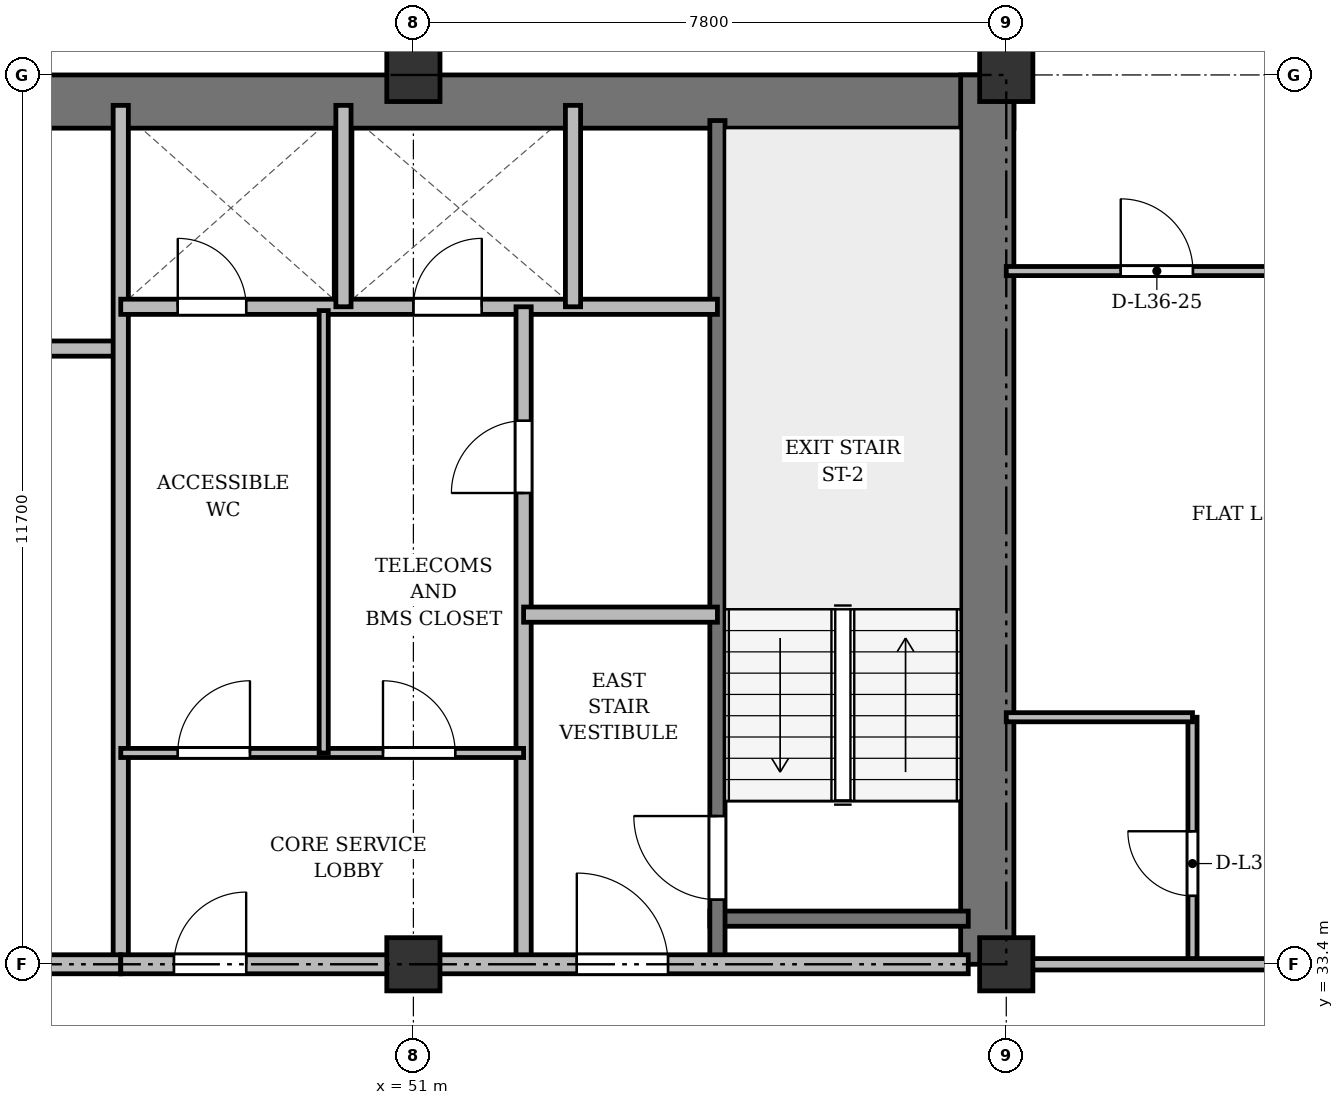
"""IFC4 building model, lengths in metres.
Left out: names, types, materials, properties, quantities, classifications, styles, units other than length and angle.
Written with IfcOpenShell. Run it as: python <this file> out.ifc"""

import sys

from ifc_helpers import new_model, si_unit, direction, frame, frame_2d, origin, origin_2d, place, context, subcontext, project, spatial, rectangle, extrude, source, transform, mapped, element, fill, save


model = new_model("IFC4")
c1 = context("Model", 3, precision=1e-05, world=origin(), true_north=direction((0.0, 1.0)))
c2 = subcontext(c1, "Body", "Model", "MODEL_VIEW")
j1 = project(units=[si_unit("LENGTHUNIT", "METRE"), si_unit("PLANEANGLEUNIT", "RADIAN")], contexts=[c1])
p1 = place(None, origin())
s1 = spatial("IfcSite", under=j1, at=p1, CompositionType="ELEMENT")
p2 = place(p1, origin())
s2 = spatial("IfcBuilding", under=s1, at=p2, CompositionType="ELEMENT")
p3 = place(p2, frame((0.0, 0.0, 139.3)))
s3 = spatial("IfcBuildingStorey", under=s2, at=p3, CompositionType="ELEMENT", Elevation=139.3)
m1 = source(origin(), c2, "Body", "SweptSolid", [
    extrude(rectangle(XDim=0.7, YDim=0.7, at=origin_2d()), origin(), (0.0, 0.0, 1.0), 3.6),
])
for number, where, z_axis, x_axis in (
    (1, (51.0, 33.4, 0.0), (0.0, 0.0, 1.0), (1.0, 0.0, 0.0)),
    (2, (51.0, 45.1, 0.0), (0.0, 0.0, 1.0), (1.0, 0.0, 0.0)),
    (3, (58.8, 33.4, 0.0), (0.0, 0.0, 1.0), (1.0, 0.0, 0.0)),
    (4, (58.8, 45.1, 0.0), (0.0, 0.0, 1.0), (1.0, 0.0, 0.0)),
):
    element("IfcColumn", number, at=place(p3, frame(where, z_axis=z_axis, x_axis=x_axis)), inside=s3, PredefinedType="COLUMN", context=c2, shape_type="MappedRepresentation", body=[
        mapped(m1, transform((0.0, 0.0, 0.0), x_axis=(1.0, 0.0, 0.0), y_axis=(0.0, 1.0, 0.0), z_axis=(0.0, 0.0, 1.0), scale=1.0)),
    ])
p4 = place(p3, frame((15.5, 44.75, 0.0), z_axis=(0.0, 0.0, 1.0), x_axis=(1.0, 0.0, 0.0)))
e5 = element("IfcWall", 5, at=p4, inside=s3, PredefinedType="SHEAR", context=c2, shape_type="SweptSolid", body=[
    extrude(rectangle(XDim=43.4, YDim=0.7, at=frame_2d((21.7, 0.0))), origin(), (0.0, 0.0, 1.0), 3.35),
])
p5 = place(p3, frame((58.55, 33.4, 0.0), z_axis=(0.0, 0.0, 1.0), x_axis=(0.0, 1.0, 0.0)))
e6 = element("IfcWall", 6, at=p5, inside=s3, PredefinedType="SHEAR", context=c2, shape_type="SweptSolid", body=[
    extrude(rectangle(XDim=11.7, YDim=0.7, at=frame_2d((5.85, 0.0))), origin(), (0.0, 0.0, 1.0), 3.35),
])
p6 = place(p3, frame((54.9, 34.0, 0.0), z_axis=(0.0, 0.0, 1.0), x_axis=(1.0, 0.0, 0.0)))
e7 = element("IfcWall", 7, at=p6, inside=s3, PredefinedType="SHEAR", context=c2, shape_type="SweptSolid", body=[
    extrude(rectangle(XDim=3.4, YDim=0.2, at=frame_2d((1.7, 0.0))), origin(), (0.0, 0.0, 1.0), 3.35),
])
p7 = place(p3, frame((55.0, 33.4, 0.0), z_axis=(0.0, 0.0, 1.0), x_axis=(0.0, 1.0, 0.0)))
e8 = element("IfcWall", 8, at=p7, inside=s3, PredefinedType="SHEAR", context=c2, shape_type="SweptSolid", body=[
    extrude(rectangle(XDim=11.1, YDim=0.2, at=frame_2d((5.55, 0.0))), origin(), (0.0, 0.0, 1.0), 3.35),
])
p8 = place(p7, frame((0.85, 0.0, 0.0)))
e9 = element("IfcOpeningElement", 9, at=p8, cuts=e8, PredefinedType="OPENING", context=c2, shape_type="SweptSolid", body=[
    extrude(rectangle(XDim=1.1, YDim=2.15, at=frame_2d((0.55, 1.075))), frame((0.0, 0.11, 0.0), z_axis=(0.0, -1.0, 0.0), x_axis=(1.0, 0.0, 0.0)), (0.0, 0.0, 1.0), 0.22),
])
p9 = place(p3, frame((40.25, 41.5, 0.0), z_axis=(0.0, 0.0, 1.0), x_axis=(1.0, 0.0, 0.0)))
e10 = element("IfcWall", 10, at=p9, inside=s3, PredefinedType="SOLIDWALL", context=c2, shape_type="SweptSolid", body=[
    extrude(rectangle(XDim=6.9, YDim=0.2, at=frame_2d((3.45, 0.0))), origin(), (0.0, 0.0, 1.0), 2.85),
])
p10 = place(p3, frame((47.15, 33.4, 0.0), z_axis=(0.0, 0.0, 1.0), x_axis=(0.0, 1.0, 0.0)))
e11 = element("IfcWall", 11, at=p10, inside=s3, PredefinedType="SOLIDWALL", context=c2, shape_type="SweptSolid", body=[
    extrude(rectangle(XDim=11.3, YDim=0.2, at=frame_2d((5.65, 0.0))), origin(), (0.0, 0.0, 1.0), 2.75),
])
p11 = place(p3, frame((33.3, 33.4, 0.0), z_axis=(0.0, 0.0, 1.0), x_axis=(1.0, 0.0, 0.0)))
e12 = element("IfcWall", 12, at=p11, inside=s3, PredefinedType="PARTITIONING", context=c2, shape_type="SweptSolid", body=[
    extrude(rectangle(XDim=13.85, YDim=0.25, at=frame_2d((6.925, 0.0))), origin(), (0.0, 0.0, 1.0), 2.75),
])
p12 = place(p11, frame((4.2, 0.0, 0.0)))
e13 = element("IfcOpeningElement", 13, at=p12, cuts=e12, PredefinedType="OPENING", context=c2, shape_type="SweptSolid", body=[
    extrude(rectangle(XDim=1.6, YDim=2.2, at=frame_2d((0.8, 1.1))), frame((0.0, 0.135, 0.0), z_axis=(0.0, -1.0, 0.0), x_axis=(1.0, 0.0, 0.0)), (0.0, 0.0, 1.0), 0.27),
])
p13 = place(p3, frame((47.15, 42.05, 0.0), z_axis=(0.0, 0.0, 1.0), x_axis=(1.0, 0.0, 0.0)))
e14 = element("IfcWall", 14, at=p13, inside=s3, PredefinedType="SOLIDWALL", context=c2, shape_type="SweptSolid", body=[
    extrude(rectangle(XDim=7.85, YDim=0.2, at=frame_2d((3.925, 0.0))), origin(), (0.0, 0.0, 1.0), 2.85),
])
p14 = place(p13, frame((0.75, 0.0, 0.0)))
e15 = element("IfcOpeningElement", 15, at=p14, cuts=e14, PredefinedType="OPENING", context=c2, shape_type="SweptSolid", body=[
    extrude(rectangle(XDim=0.9, YDim=2.1, at=frame_2d((0.45, 1.05))), frame((0.0, 0.11, 0.0), z_axis=(0.0, -1.0, 0.0), x_axis=(1.0, 0.0, 0.0)), (0.0, 0.0, 1.0), 0.22),
])
p15 = place(p13, frame((3.85, 0.0, 0.0)))
e16 = element("IfcOpeningElement", 16, at=p15, cuts=e14, PredefinedType="OPENING", context=c2, shape_type="SweptSolid", body=[
    extrude(rectangle(XDim=0.9, YDim=2.1, at=frame_2d((0.45, 1.05))), frame((0.0, 0.11, 0.0), z_axis=(0.0, -1.0, 0.0), x_axis=(1.0, 0.0, 0.0)), (0.0, 0.0, 1.0), 0.22),
])
for number, where, z_axis, x_axis in (
    (17, (50.08, 42.05, 0.0), (0.0, 0.0, 1.0), (0.0, 1.0, 0.0)),
    (18, (53.1, 42.05, 0.0), (0.0, 0.0, 1.0), (0.0, 1.0, 0.0)),
):
    element("IfcWall", number, at=place(p3, frame(where, z_axis=z_axis, x_axis=x_axis)), inside=s3, PredefinedType="SOLIDWALL", context=c2, shape_type="SweptSolid", body=[
        extrude(rectangle(XDim=2.65, YDim=0.2, at=frame_2d((1.325, 0.0))), origin(), (0.0, 0.0, 1.0), 3.35),
    ])
p16 = place(p3, frame((52.45, 33.4, 0.0), z_axis=(0.0, 0.0, 1.0), x_axis=(0.0, 1.0, 0.0)))
e19 = element("IfcWall", 19, at=p16, inside=s3, PredefinedType="PARTITIONING", context=c2, shape_type="SweptSolid", body=[
    extrude(rectangle(XDim=8.65, YDim=0.2, at=frame_2d((4.325, 0.0))), origin(), (0.0, 0.0, 1.0), 2.75),
])
p17 = place(p16, frame((6.2, 0.0, 0.0)))
e20 = element("IfcOpeningElement", 20, at=p17, cuts=e19, PredefinedType="OPENING", context=c2, shape_type="SweptSolid", body=[
    extrude(rectangle(XDim=0.95, YDim=2.15, at=frame_2d((0.475, 1.075))), frame((0.0, 0.11, 0.0), z_axis=(0.0, -1.0, 0.0), x_axis=(1.0, 0.0, 0.0)), (0.0, 0.0, 1.0), 0.22),
])
p18 = place(p3, frame((52.45, 38.0, 0.0), z_axis=(0.0, 0.0, 1.0), x_axis=(1.0, 0.0, 0.0)))
e21 = element("IfcWall", 21, at=p18, inside=s3, PredefinedType="PARTITIONING", context=c2, shape_type="SweptSolid", body=[
    extrude(rectangle(XDim=2.55, YDim=0.2, at=frame_2d((1.275, 0.0))), origin(), (0.0, 0.0, 1.0), 3.35),
])
p19 = place(p3, frame((47.15, 36.18, 0.0), z_axis=(0.0, 0.0, 1.0), x_axis=(1.0, 0.0, 0.0)))
e22 = element("IfcWall", 22, at=p19, inside=s3, PredefinedType="PARTITIONING", context=c2, shape_type="SweptSolid", body=[
    extrude(rectangle(XDim=5.3, YDim=0.12, at=frame_2d((2.65, 0.0))), origin(), (0.0, 0.0, 1.0), 2.85),
])
p20 = place(p19, frame((0.75, 0.0, 0.0)))
e23 = element("IfcOpeningElement", 23, at=p20, cuts=e22, PredefinedType="OPENING", context=c2, shape_type="SweptSolid", body=[
    extrude(rectangle(XDim=0.95, YDim=2.15, at=frame_2d((0.475, 1.075))), frame((0.0, 0.07, 0.0), z_axis=(0.0, -1.0, 0.0), x_axis=(1.0, 0.0, 0.0)), (0.0, 0.0, 1.0), 0.14),
])
p21 = place(p19, frame((3.45, 0.0, 0.0)))
e24 = element("IfcOpeningElement", 24, at=p21, cuts=e22, PredefinedType="OPENING", context=c2, shape_type="SweptSolid", body=[
    extrude(rectangle(XDim=0.95, YDim=2.15, at=frame_2d((0.475, 1.075))), frame((0.0, 0.07, 0.0), z_axis=(0.0, -1.0, 0.0), x_axis=(1.0, 0.0, 0.0)), (0.0, 0.0, 1.0), 0.14),
])
p22 = place(p3, frame((49.82, 36.18, 0.0), z_axis=(0.0, 0.0, 1.0), x_axis=(0.0, 1.0, 0.0)))
e25 = element("IfcWall", 25, at=p22, inside=s3, PredefinedType="PARTITIONING", context=c2, shape_type="SweptSolid", body=[
    extrude(rectangle(XDim=5.82, YDim=0.12, at=frame_2d((2.91, 0.0))), origin(), (0.0, 0.0, 1.0), 3.35),
])
p23 = place(p3, frame((47.15, 33.4, 0.0), z_axis=(0.0, 0.0, 1.0), x_axis=(1.0, 0.0, 0.0)))
e26 = element("IfcWall", 26, at=p23, inside=s3, PredefinedType="PARTITIONING", context=c2, shape_type="SweptSolid", body=[
    extrude(rectangle(XDim=11.15, YDim=0.25, at=frame_2d((5.575, 0.0))), origin(), (0.0, 0.0, 1.0), 2.75),
])
p24 = place(p23, frame((0.7, 0.0, 0.0)))
e27 = element("IfcOpeningElement", 27, at=p24, cuts=e26, PredefinedType="OPENING", context=c2, shape_type="SweptSolid", body=[
    extrude(rectangle(XDim=0.95, YDim=2.15, at=frame_2d((0.475, 1.075))), frame((0.0, 0.135, 0.0), z_axis=(0.0, -1.0, 0.0), x_axis=(1.0, 0.0, 0.0)), (0.0, 0.0, 1.0), 0.27),
])
p25 = place(p23, frame((6.0, 0.0, 0.0)))
e28 = element("IfcOpeningElement", 28, at=p25, cuts=e26, PredefinedType="OPENING", context=c2, shape_type="SweptSolid", body=[
    extrude(rectangle(XDim=1.2, YDim=2.15, at=frame_2d((0.6, 1.075))), frame((0.0, 0.135, 0.0), z_axis=(0.0, -1.0, 0.0), x_axis=(1.0, 0.0, 0.0)), (0.0, 0.0, 1.0), 0.27),
])
p26 = place(p3, frame((61.25, 33.4, 0.0), z_axis=(0.0, 0.0, 1.0), x_axis=(0.0, 1.0, 0.0)))
e29 = element("IfcWall", 29, at=p26, inside=s3, PredefinedType="PARTITIONING", context=c2, shape_type="SweptSolid", body=[
    extrude(rectangle(XDim=3.25, YDim=0.12, at=frame_2d((1.625, 0.0))), origin(), (0.0, 0.0, 1.0), 2.75),
])
p27 = place(p26, frame((0.9, 0.0, 0.0)))
e30 = element("IfcOpeningElement", 30, at=p27, cuts=e29, PredefinedType="OPENING", context=c2, shape_type="SweptSolid", body=[
    extrude(rectangle(XDim=0.85, YDim=2.1, at=frame_2d((0.425, 1.05))), frame((0.0, 0.07, 0.0), z_axis=(0.0, -1.0, 0.0), x_axis=(1.0, 0.0, 0.0)), (0.0, 0.0, 1.0), 0.14),
])
p28 = place(p3, frame((58.8, 36.65, 0.0), z_axis=(0.0, 0.0, 1.0), x_axis=(1.0, 0.0, 0.0)))
e31 = element("IfcWall", 31, at=p28, inside=s3, PredefinedType="PARTITIONING", context=c2, shape_type="SweptSolid", body=[
    extrude(rectangle(XDim=2.45, YDim=0.12, at=frame_2d((1.225, 0.0))), origin(), (0.0, 0.0, 1.0), 2.85),
])
p29 = place(p3, frame((58.8, 42.52, 0.0), z_axis=(0.0, 0.0, 1.0), x_axis=(1.0, 0.0, 0.0)))
e32 = element("IfcWall", 32, at=p29, inside=s3, PredefinedType="PARTITIONING", context=c2, shape_type="SweptSolid", body=[
    extrude(rectangle(XDim=3.775, YDim=0.12, at=frame_2d((1.887, 0.0))), origin(), (0.0, 0.0, 1.0), 2.85),
])
p30 = place(p29, frame((1.506, 0.0, 0.0)))
e33 = element("IfcOpeningElement", 33, at=p30, cuts=e32, PredefinedType="OPENING", context=c2, shape_type="SweptSolid", body=[
    extrude(rectangle(XDim=0.95, YDim=2.15, at=frame_2d((0.475, 1.075))), frame((0.0, 0.07, 0.0), z_axis=(0.0, -1.0, 0.0), x_axis=(1.0, 0.0, 0.0)), (0.0, 0.0, 1.0), 0.14),
])
p31 = place(p3, frame((58.8, 33.4, 0.0), z_axis=(0.0, 0.0, 1.0), x_axis=(1.0, 0.0, 0.0)))
e34 = element("IfcWall", 34, at=p31, inside=s3, PredefinedType="PARTITIONING", context=c2, shape_type="SweptSolid", body=[
    extrude(rectangle(XDim=7.55, YDim=0.15, at=frame_2d((3.775, 0.0))), origin(), (0.0, 0.0, 1.0), 2.75),
])
p32 = place(p31, frame((4.375, 0.0, 0.0)))
e35 = element("IfcOpeningElement", 35, at=p32, cuts=e34, PredefinedType="OPENING", context=c2, shape_type="SweptSolid", body=[
    extrude(rectangle(XDim=0.95, YDim=2.15, at=frame_2d((0.475, 1.075))), frame((0.0, 0.085, 0.0), z_axis=(0.0, -1.0, 0.0), x_axis=(1.0, 0.0, 0.0)), (0.0, 0.0, 1.0), 0.17),
])
p33 = place(p3, frame((58.8, 44.75, 0.0), z_axis=(0.0, 0.0, 1.0), x_axis=(0.0, 1.0, 0.0)))
e36 = element("IfcWall", 36, at=p33, inside=s3, PredefinedType="PARTITIONING", context=c2, shape_type="SweptSolid", body=[
    extrude(rectangle(XDim=3.61, YDim=0.15, at=frame_2d((1.805, 0.0))), origin(), (0.0, 0.0, 1.0), 2.85),
])
p34 = place(p33, frame((1.1, 0.0, 0.0)))
e37 = element("IfcOpeningElement", 37, at=p34, cuts=e36, PredefinedType="OPENING", context=c2, shape_type="SweptSolid", body=[
    extrude(rectangle(XDim=0.95, YDim=2.15, at=frame_2d((0.475, 1.075))), frame((0.0, 0.085, 0.0), z_axis=(0.0, -1.0, 0.0), x_axis=(1.0, 0.0, 0.0)), (0.0, 0.0, 1.0), 0.17),
])
m2 = source(origin(), c2, "Body", "SweptSolid", [
    extrude(rectangle(XDim=1.1, YDim=2.15, at=frame_2d((0.55, 1.075))), frame((0.0, 0.025, 0.0), z_axis=(0.0, -1.0, 0.0), x_axis=(1.0, 0.0, 0.0)), (0.0, 0.0, 1.0), 0.05),
])
p35 = place(p8, origin())
e38 = element("IfcDoor", 38, at=p35, inside=s3, OperationType="SINGLE_SWING_RIGHT", PredefinedType="DOOR", context=c2, shape_type="MappedRepresentation", body=[
    mapped(m2, transform((0.0, 0.0, 0.0), x_axis=(1.0, 0.0, 0.0), y_axis=(0.0, 1.0, 0.0), z_axis=(0.0, 0.0, 1.0), scale=1.0)),
])
fill(e9, e38)
m3 = source(origin(), c2, "Body", "SweptSolid", [
    extrude(rectangle(XDim=0.9, YDim=2.1, at=frame_2d((0.45, 1.05))), frame((0.0, 0.025, 0.0), z_axis=(0.0, -1.0, 0.0), x_axis=(1.0, 0.0, 0.0)), (0.0, 0.0, 1.0), 0.05),
])
p36 = place(p14, origin())
e39 = element("IfcDoor", 39, at=p36, inside=s3, OperationType="SINGLE_SWING_LEFT", PredefinedType="DOOR", context=c2, shape_type="MappedRepresentation", body=[
    mapped(m3, transform((0.0, 0.0, 0.0), x_axis=(1.0, 0.0, 0.0), y_axis=(0.0, 1.0, 0.0), z_axis=(0.0, 0.0, 1.0), scale=1.0)),
])
fill(e15, e39)
p37 = place(p15, origin())
e40 = element("IfcDoor", 40, at=p37, inside=s3, OperationType="SINGLE_SWING_RIGHT", PredefinedType="DOOR", context=c2, shape_type="MappedRepresentation", body=[
    mapped(m3, transform((0.0, 0.0, 0.0), x_axis=(1.0, 0.0, 0.0), y_axis=(0.0, 1.0, 0.0), z_axis=(0.0, 0.0, 1.0), scale=1.0)),
])
fill(e16, e40)
m4 = source(origin(), c2, "Body", "SweptSolid", [
    extrude(rectangle(XDim=0.95, YDim=2.15, at=frame_2d((0.475, 1.075))), frame((0.0, 0.025, 0.0), z_axis=(0.0, -1.0, 0.0), x_axis=(1.0, 0.0, 0.0)), (0.0, 0.0, 1.0), 0.05),
])
p38 = place(p17, origin())
e41 = element("IfcDoor", 41, at=p38, inside=s3, OperationType="SINGLE_SWING_LEFT", PredefinedType="DOOR", context=c2, shape_type="MappedRepresentation", body=[
    mapped(m4, transform((0.0, 0.0, 0.0), x_axis=(1.0, 0.0, 0.0), y_axis=(0.0, 1.0, 0.0), z_axis=(0.0, 0.0, 1.0), scale=1.0)),
])
fill(e20, e41)
p39 = place(p20, origin())
e42 = element("IfcDoor", 42, at=p39, inside=s3, OperationType="SINGLE_SWING_RIGHT", PredefinedType="DOOR", context=c2, shape_type="MappedRepresentation", body=[
    mapped(m4, transform((0.0, 0.0, 0.0), x_axis=(1.0, 0.0, 0.0), y_axis=(0.0, 1.0, 0.0), z_axis=(0.0, 0.0, 1.0), scale=1.0)),
])
fill(e23, e42)
p40 = place(p21, origin())
e43 = element("IfcDoor", 43, at=p40, inside=s3, OperationType="SINGLE_SWING_LEFT", PredefinedType="DOOR", context=c2, shape_type="MappedRepresentation", body=[
    mapped(m4, transform((0.0, 0.0, 0.0), x_axis=(1.0, 0.0, 0.0), y_axis=(0.0, 1.0, 0.0), z_axis=(0.0, 0.0, 1.0), scale=1.0)),
])
fill(e24, e43)
p41 = place(p24, origin())
e44 = element("IfcDoor", 44, at=p41, inside=s3, OperationType="SINGLE_SWING_RIGHT", PredefinedType="DOOR", context=c2, shape_type="MappedRepresentation", body=[
    mapped(m4, transform((0.0, 0.0, 0.0), x_axis=(1.0, 0.0, 0.0), y_axis=(0.0, 1.0, 0.0), z_axis=(0.0, 0.0, 1.0), scale=1.0)),
])
fill(e27, e44)
m5 = source(origin(), c2, "Body", "SweptSolid", [
    extrude(rectangle(XDim=1.2, YDim=2.15, at=frame_2d((0.6, 1.075))), frame((0.0, 0.025, 0.0), z_axis=(0.0, -1.0, 0.0), x_axis=(1.0, 0.0, 0.0)), (0.0, 0.0, 1.0), 0.05),
])
p42 = place(p25, origin())
e45 = element("IfcDoor", 45, at=p42, inside=s3, OperationType="SINGLE_SWING_LEFT", PredefinedType="DOOR", context=c2, shape_type="MappedRepresentation", body=[
    mapped(m5, transform((0.0, 0.0, 0.0), x_axis=(1.0, 0.0, 0.0), y_axis=(0.0, 1.0, 0.0), z_axis=(0.0, 0.0, 1.0), scale=1.0)),
])
fill(e28, e45)
m6 = source(origin(), c2, "Body", "SweptSolid", [
    extrude(rectangle(XDim=0.85, YDim=2.1, at=frame_2d((0.425, 1.05))), frame((0.0, 0.025, 0.0), z_axis=(0.0, -1.0, 0.0), x_axis=(1.0, 0.0, 0.0)), (0.0, 0.0, 1.0), 0.05),
])
p43 = place(p27, origin())
e46 = element("IfcDoor", 46, at=p43, inside=s3, OperationType="SINGLE_SWING_RIGHT", PredefinedType="DOOR", context=c2, shape_type="MappedRepresentation", body=[
    mapped(m6, transform((0.0, 0.0, 0.0), x_axis=(1.0, 0.0, 0.0), y_axis=(0.0, 1.0, 0.0), z_axis=(0.0, 0.0, 1.0), scale=1.0)),
])
fill(e30, e46)
p44 = place(p30, origin())
e47 = element("IfcDoor", 47, at=p44, inside=s3, OperationType="SINGLE_SWING_LEFT", PredefinedType="DOOR", context=c2, shape_type="MappedRepresentation", body=[
    mapped(m4, transform((0.0, 0.0, 0.0), x_axis=(1.0, 0.0, 0.0), y_axis=(0.0, 1.0, 0.0), z_axis=(0.0, 0.0, 1.0), scale=1.0)),
])
fill(e33, e47)
save(model, sys.argv[1])
